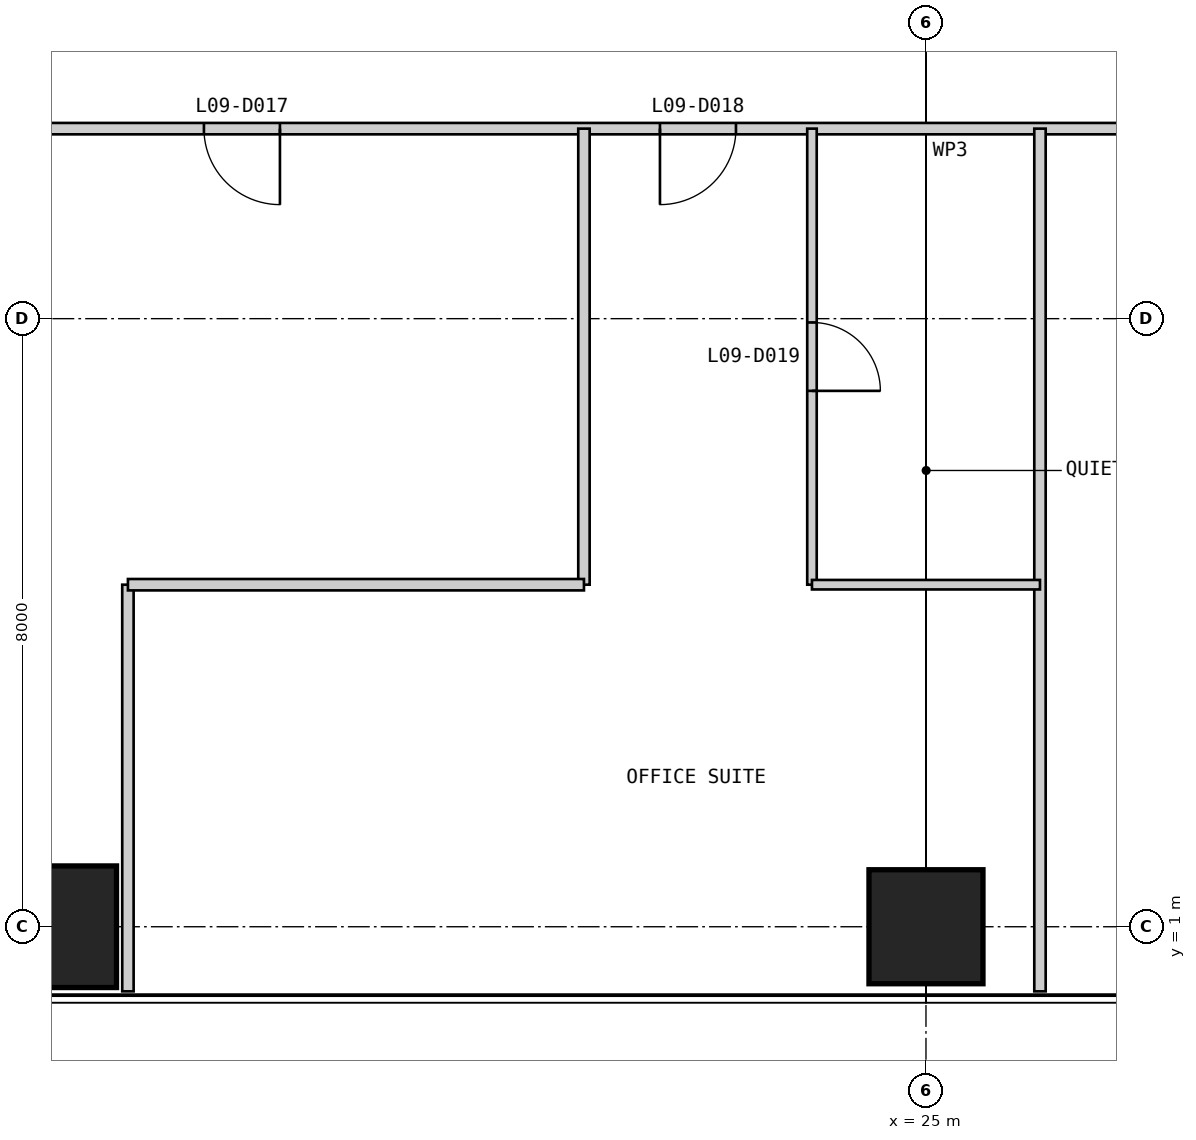
"""IFC4 building model, lengths in metres.
Left out: names, types, materials, properties, quantities, classifications, styles, units other than length and angle.
Written with IfcOpenShell. Run it as: python <this file> out.ifc"""

import sys

from ifc_helpers import new_model, si_unit, direction, frame, frame_2d, origin, origin_2d, place, context, subcontext, project, spatial, rectangle, extrude, element, fill, save


model = new_model("IFC4")
c1 = context("Model", 3, precision=1e-05, world=origin(), true_north=direction((0.0, 1.0)))
c2 = subcontext(c1, "Body", "Model", "MODEL_VIEW")
j1 = project(units=[si_unit("LENGTHUNIT", "METRE"), si_unit("PLANEANGLEUNIT", "RADIAN")], contexts=[c1])
p1 = place(None, origin())
s1 = spatial("IfcSite", under=j1, at=p1, CompositionType="ELEMENT")
p2 = place(p1, origin())
s2 = spatial("IfcBuilding", under=s1, at=p2, CompositionType="ELEMENT")
p3 = place(p2, frame((0.0, 0.0, 43.0)))
s3 = spatial("IfcBuildingStorey", under=s2, at=p3, CompositionType="ELEMENT", Elevation=43.0)
p4 = place(p3, frame((13.0, 1.0, 0.0), z_axis=(0.0, 0.0, 1.0), x_axis=(1.0, 0.0, 0.0)))
e1 = element("IfcColumn", 1, at=p4, inside=s3, PredefinedType="COLUMN", context=c2, shape_type="SweptSolid", body=[
    extrude(rectangle(XDim=2.7, YDim=1.6, at=origin_2d()), origin(), (0.0, 0.0, 1.0), 4.0),
])
p5 = place(p3, frame((25.0, 1.0, 0.0), z_axis=(0.0, 0.0, 1.0), x_axis=(1.0, 0.0, 0.0)))
e2 = element("IfcColumn", 2, at=p5, inside=s3, PredefinedType="COLUMN", context=c2, shape_type="SweptSolid", body=[
    extrude(rectangle(XDim=1.5, YDim=1.5, at=origin_2d()), origin(), (0.0, 0.0, 1.0), 4.0),
])
p6 = place(p3, frame((11.5, 11.5, 0.0), z_axis=(0.0, 0.0, 1.0), x_axis=(1.0, 0.0, 0.0)))
e3 = element("IfcWall", 3, at=p6, inside=s3, PredefinedType="PARTITIONING", context=c2, shape_type="SweptSolid", body=[
    extrude(rectangle(XDim=27.0, YDim=0.15, at=frame_2d((13.5, 0.0))), origin(), (0.0, 0.0, 1.0), 3.85),
])
p7 = place(p6, frame((4.0, 0.0, 0.0)))
e4 = element("IfcOpeningElement", 4, at=p7, cuts=e3, PredefinedType="OPENING", context=c2, shape_type="SweptSolid", body=[
    extrude(rectangle(XDim=1.0, YDim=2.2, at=frame_2d((0.5, 1.1))), frame((0.0, 0.085, 0.0), z_axis=(0.0, -1.0, 0.0), x_axis=(1.0, 0.0, 0.0)), (0.0, 0.0, 1.0), 0.17),
])
p8 = place(p6, frame((10.0, 0.0, 0.0)))
e5 = element("IfcOpeningElement", 5, at=p8, cuts=e3, PredefinedType="OPENING", context=c2, shape_type="SweptSolid", body=[
    extrude(rectangle(XDim=1.0, YDim=2.2, at=frame_2d((0.5, 1.1))), frame((0.0, 0.085, 0.0), z_axis=(0.0, -1.0, 0.0), x_axis=(1.0, 0.0, 0.0)), (0.0, 0.0, 1.0), 0.17),
])
p9 = place(p6, frame((17.5, 0.0, 0.0)))
e6 = element("IfcOpeningElement", 6, at=p9, cuts=e3, PredefinedType="OPENING", context=c2, shape_type="SweptSolid", body=[
    extrude(rectangle(XDim=1.0, YDim=2.2, at=frame_2d((0.5, 1.1))), frame((0.0, 0.085, 0.0), z_axis=(0.0, -1.0, 0.0), x_axis=(1.0, 0.0, 0.0)), (0.0, 0.0, 1.0), 0.17),
])
p10 = place(p6, frame((23.5, 0.0, 0.0)))
e7 = element("IfcOpeningElement", 7, at=p10, cuts=e3, PredefinedType="OPENING", context=c2, shape_type="SweptSolid", body=[
    extrude(rectangle(XDim=1.0, YDim=2.2, at=frame_2d((0.5, 1.1))), frame((0.0, 0.085, 0.0), z_axis=(0.0, -1.0, 0.0), x_axis=(1.0, 0.0, 0.0)), (0.0, 0.0, 1.0), 0.17),
])
p11 = place(p3, frame((14.5, 0.15, 0.0), z_axis=(0.0, 0.0, 1.0), x_axis=(0.0, 1.0, 0.0)))
e8 = element("IfcWall", 8, at=p11, inside=s3, PredefinedType="PARTITIONING", context=c2, shape_type="SweptSolid", body=[
    extrude(rectangle(XDim=5.35, YDim=0.15, at=frame_2d((2.675, 0.0))), origin(), (0.0, 0.0, 1.0), 3.85),
])
p12 = place(p3, frame((20.5, 5.5, 0.0), z_axis=(0.0, 0.0, 1.0), x_axis=(0.0, 1.0, 0.0)))
e9 = element("IfcWall", 9, at=p12, inside=s3, PredefinedType="PARTITIONING", context=c2, shape_type="SweptSolid", body=[
    extrude(rectangle(XDim=6.0, YDim=0.15, at=frame_2d((3.0, 0.0))), origin(), (0.0, 0.0, 1.0), 3.85),
])
p13 = place(p3, frame((23.5, 5.5, 0.0), z_axis=(0.0, 0.0, 1.0), x_axis=(0.0, 1.0, 0.0)))
e10 = element("IfcWall", 10, at=p13, inside=s3, PredefinedType="PARTITIONING", context=c2, shape_type="SweptSolid", body=[
    extrude(rectangle(XDim=6.0, YDim=0.125, at=frame_2d((3.0, 0.0))), origin(), (0.0, 0.0, 1.0), 3.85),
])
p14 = place(p13, frame((2.55, 0.0, 0.0)))
e11 = element("IfcOpeningElement", 11, at=p14, cuts=e10, PredefinedType="OPENING", context=c2, shape_type="SweptSolid", body=[
    extrude(rectangle(XDim=0.9, YDim=2.2, at=frame_2d((0.45, 1.1))), frame((0.0, 0.073, 0.0), z_axis=(0.0, -1.0, 0.0), x_axis=(1.0, 0.0, 0.0)), (0.0, 0.0, 1.0), 0.145),
])
p15 = place(p3, frame((26.5, 0.15, 0.0), z_axis=(0.0, 0.0, 1.0), x_axis=(0.0, 1.0, 0.0)))
e12 = element("IfcWall", 12, at=p15, inside=s3, PredefinedType="PARTITIONING", context=c2, shape_type="SweptSolid", body=[
    extrude(rectangle(XDim=11.35, YDim=0.15, at=frame_2d((5.675, 0.0))), origin(), (0.0, 0.0, 1.0), 3.85),
])
p16 = place(p3, frame((14.5, 5.5, 0.0), z_axis=(0.0, 0.0, 1.0), x_axis=(1.0, 0.0, 0.0)))
e13 = element("IfcWall", 13, at=p16, inside=s3, PredefinedType="PARTITIONING", context=c2, shape_type="SweptSolid", body=[
    extrude(rectangle(XDim=6.0, YDim=0.15, at=frame_2d((3.0, 0.0))), origin(), (0.0, 0.0, 1.0), 3.85),
])
p17 = place(p3, frame((23.5, 5.5, 0.0), z_axis=(0.0, 0.0, 1.0), x_axis=(1.0, 0.0, 0.0)))
e14 = element("IfcWall", 14, at=p17, inside=s3, PredefinedType="PARTITIONING", context=c2, shape_type="SweptSolid", body=[
    extrude(rectangle(XDim=3.0, YDim=0.125, at=frame_2d((1.5, 0.0))), origin(), (0.0, 0.0, 1.0), 3.85),
])
p18 = place(p7, frame((1.0, 0.0, 0.0), z_axis=(0.0, 0.0, 1.0), x_axis=(-1.0, 0.0, 0.0)))
e15 = element("IfcDoor", 15, at=p18, inside=s3, OperationType="SINGLE_SWING_LEFT", PredefinedType="DOOR", context=c2, shape_type="SweptSolid", body=[
    extrude(rectangle(XDim=1.0, YDim=2.2, at=frame_2d((0.5, 1.1))), frame((0.0, 0.025, 0.0), z_axis=(0.0, -1.0, 0.0), x_axis=(1.0, 0.0, 0.0)), (0.0, 0.0, 1.0), 0.05),
])
fill(e4, e15)
p19 = place(p8, frame((1.0, 0.0, 0.0), z_axis=(0.0, 0.0, 1.0), x_axis=(-1.0, 0.0, 0.0)))
e16 = element("IfcDoor", 16, at=p19, inside=s3, OperationType="SINGLE_SWING_RIGHT", PredefinedType="DOOR", context=c2, shape_type="SweptSolid", body=[
    extrude(rectangle(XDim=1.0, YDim=2.2, at=frame_2d((0.5, 1.1))), frame((0.0, 0.025, 0.0), z_axis=(0.0, -1.0, 0.0), x_axis=(1.0, 0.0, 0.0)), (0.0, 0.0, 1.0), 0.05),
])
fill(e5, e16)
p20 = place(p14, frame((0.9, 0.0, 0.0), z_axis=(0.0, 0.0, 1.0), x_axis=(-1.0, 0.0, 0.0)))
e17 = element("IfcDoor", 17, at=p20, inside=s3, OperationType="SINGLE_SWING_RIGHT", PredefinedType="DOOR", context=c2, shape_type="SweptSolid", body=[
    extrude(rectangle(XDim=0.9, YDim=2.2, at=frame_2d((0.45, 1.1))), frame((0.0, 0.025, 0.0), z_axis=(0.0, -1.0, 0.0), x_axis=(1.0, 0.0, 0.0)), (0.0, 0.0, 1.0), 0.05),
])
fill(e11, e17)
save(model, sys.argv[1])
